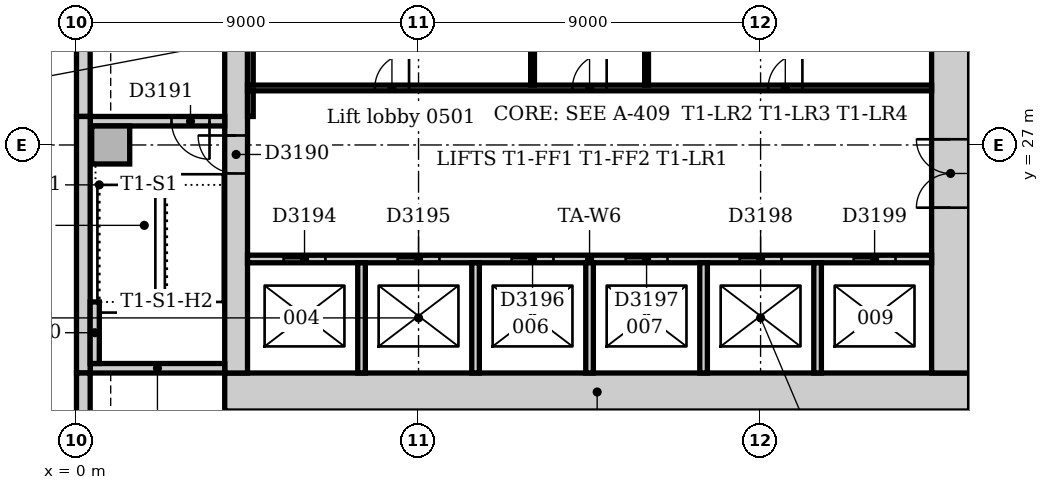
"""IFC4 building model, lengths in metres.
Left out: names, types, materials, properties, quantities, classifications, styles, units other than length and angle.
Written with IfcOpenShell. Run it as: python <this file> out.ifc"""

import sys

from ifc_helpers import new_model, si_unit, direction, frame, frame_2d, origin, origin_2d, place, context, subcontext, project, spatial, rectangle, extrude, element, fill, save


model = new_model("IFC4")
c1 = context("Model", 3, precision=1e-05, world=origin(), true_north=direction((0.0, 1.0)))
c2 = subcontext(c1, "Body", "Model", "MODEL_VIEW")
j1 = project(units=[si_unit("LENGTHUNIT", "METRE"), si_unit("PLANEANGLEUNIT", "RADIAN")], contexts=[c1])
p1 = place(None, origin())
s1 = spatial("IfcSite", under=j1, at=p1, CompositionType="ELEMENT")
p2 = place(p1, origin())
s2 = spatial("IfcBuilding", under=s1, at=p2, CompositionType="ELEMENT")
p3 = place(p2, frame((0.0, 0.0, 26.0)))
s3 = spatial("IfcBuildingStorey", under=s2, at=p3, CompositionType="ELEMENT", Elevation=26.0)
p4 = place(p3, frame((3.9, 20.5, 0.0), z_axis=(0.0, 0.0, 1.0), x_axis=(1.0, 0.0, 0.0)))
e1 = element("IfcWall", 1, at=p4, inside=s3, PredefinedType="SOLIDWALL", context=c2, shape_type="SweptSolid", body=[
    extrude(rectangle(XDim=19.6, YDim=1.0, at=frame_2d((9.8, 0.0))), origin(), (0.0, 0.0, 1.0), 4.0),
])
p5 = place(p3, frame((23.0, 21.0, 0.0), z_axis=(0.0, 0.0, 1.0), x_axis=(0.0, 1.0, 0.0)))
e2 = element("IfcWall", 2, at=p5, inside=s3, PredefinedType="SOLIDWALL", context=c2, shape_type="SweptSolid", body=[
    extrude(rectangle(XDim=10.5, YDim=1.0, at=frame_2d((5.25, 0.0))), origin(), (0.0, 0.0, 1.0), 4.0),
])
p6 = place(p5, frame((4.35, 0.0, 0.0)))
e3 = element("IfcOpeningElement", 3, at=p6, cuts=e2, PredefinedType="OPENING", context=c2, shape_type="SweptSolid", body=[
    extrude(rectangle(XDim=1.8, YDim=2.1, at=frame_2d((0.9, 1.05))), frame((0.0, 0.51, 0.0), z_axis=(0.0, -1.0, 0.0), x_axis=(1.0, 0.0, 0.0)), (0.0, 0.0, 1.0), 1.02),
])
p7 = place(p3, frame((4.2, 31.5, 0.0), z_axis=(0.0, 0.0, 1.0), x_axis=(0.0, -1.0, 0.0)))
e4 = element("IfcWall", 4, at=p7, inside=s3, PredefinedType="SOLIDWALL", context=c2, shape_type="SweptSolid", body=[
    extrude(rectangle(XDim=10.5, YDim=0.6, at=frame_2d((5.25, 0.0))), origin(), (0.0, 0.0, 1.0), 4.0),
])
p8 = place(p7, frame((4.25, 0.0, 0.0)))
e5 = element("IfcOpeningElement", 5, at=p8, cuts=e4, PredefinedType="OPENING", context=c2, shape_type="SweptSolid", body=[
    extrude(rectangle(XDim=1.0, YDim=2.1, at=frame_2d((0.5, 1.05))), frame((0.0, 0.31, 0.0), z_axis=(0.0, -1.0, 0.0), x_axis=(1.0, 0.0, 0.0)), (0.0, 0.0, 1.0), 0.62),
])
p9 = place(p3, frame((0.36, 21.125, 0.0), z_axis=(0.0, 0.0, 1.0), x_axis=(1.0, 0.0, 0.0)))
e6 = element("IfcWall", 6, at=p9, inside=s3, PredefinedType="SOLIDWALL", context=c2, shape_type="SweptSolid", body=[
    extrude(rectangle(XDim=3.54, YDim=0.25, at=frame_2d((1.77, 0.0))), origin(), (0.0, 0.0, 1.0), 4.0),
])
p10 = place(p3, frame((3.9, 27.625, 0.0), z_axis=(0.0, 0.0, 1.0), x_axis=(-1.0, 0.0, 0.0)))
e7 = element("IfcWall", 7, at=p10, inside=s3, PredefinedType="SOLIDWALL", context=c2, shape_type="SweptSolid", body=[
    extrude(rectangle(XDim=3.54, YDim=0.25, at=frame_2d((1.77, 0.0))), origin(), (0.0, 0.0, 1.0), 4.0),
])
p11 = place(p10, frame((0.4, 0.0, 0.0)))
e8 = element("IfcOpeningElement", 8, at=p11, cuts=e7, PredefinedType="OPENING", context=c2, shape_type="SweptSolid", body=[
    extrude(rectangle(XDim=1.0, YDim=2.1, at=frame_2d((0.5, 1.05))), frame((0.0, 0.135, 0.0), z_axis=(0.0, -1.0, 0.0), x_axis=(1.0, 0.0, 0.0)), (0.0, 0.0, 1.0), 0.27),
])
p12 = place(p3, frame((0.9, 27.0, 0.0), z_axis=(0.0, 0.0, 1.0), x_axis=(1.0, 0.0, 0.0)))
e9 = element("IfcColumn", 9, at=p12, inside=s3, PredefinedType="COLUMN", context=c2, shape_type="SweptSolid", body=[
    extrude(rectangle(XDim=1.0, YDim=1.0, at=origin_2d()), origin(), (0.0, 0.0, 1.0), 4.0),
])
p13 = place(p3, frame((0.18, 35.25, 0.0), z_axis=(0.0, 0.0, 1.0), x_axis=(0.0, -1.0, 0.0)))
e10 = element("IfcWall", 10, at=p13, inside=s3, PredefinedType="STANDARD", context=c2, shape_type="SweptSolid", body=[
    extrude(rectangle(XDim=7.5, YDim=0.36, at=frame_2d((3.75, 0.0))), origin(), (0.0, 0.0, 1.0), 3.85),
])
p14 = place(p3, frame((0.18, 27.75, 0.0), z_axis=(0.0, 0.0, 1.0), x_axis=(0.0, -1.0, 0.0)))
e11 = element("IfcWall", 11, at=p14, inside=s3, PredefinedType="STANDARD", context=c2, shape_type="SweptSolid", body=[
    extrude(rectangle(XDim=6.75, YDim=0.36, at=frame_2d((3.375, 0.0))), origin(), (0.0, 0.0, 1.0), 3.85),
])
p15 = place(p3, frame((0.18, 21.0, 0.0), z_axis=(0.0, 0.0, 1.0), x_axis=(0.0, -1.0, 0.0)))
e12 = element("IfcWall", 12, at=p15, inside=s3, PredefinedType="STANDARD", context=c2, shape_type="SweptSolid", body=[
    extrude(rectangle(XDim=16.757, YDim=0.36, at=frame_2d((8.379, 0.0))), origin(), (0.0, 0.0, 1.0), 3.85),
])
p16 = place(p15, frame((1.35, 0.0, 0.9)))
e13 = element("IfcOpeningElement", 13, at=p16, cuts=e12, PredefinedType="OPENING", context=c2, shape_type="SweptSolid", body=[
    extrude(rectangle(XDim=3.3, YDim=1.6, at=frame_2d((1.65, 0.8))), frame((0.0, 0.19, 0.0), z_axis=(0.0, -1.0, 0.0), x_axis=(1.0, 0.0, 0.0)), (0.0, 0.0, 1.0), 0.38),
])
p17 = place(p15, frame((6.15, 0.0, 0.9)))
e14 = element("IfcOpeningElement", 14, at=p17, cuts=e12, PredefinedType="OPENING", context=c2, shape_type="SweptSolid", body=[
    extrude(rectangle(XDim=3.3, YDim=1.6, at=frame_2d((1.65, 0.8))), frame((0.0, 0.19, 0.0), z_axis=(0.0, -1.0, 0.0), x_axis=(1.0, 0.0, 0.0)), (0.0, 0.0, 1.0), 0.38),
])
p18 = place(p15, frame((10.35, 0.0, 0.9)))
e15 = element("IfcOpeningElement", 15, at=p18, cuts=e12, PredefinedType="OPENING", context=c2, shape_type="SweptSolid", body=[
    extrude(rectangle(XDim=3.3, YDim=1.6, at=frame_2d((1.65, 0.8))), frame((0.0, 0.19, 0.0), z_axis=(0.0, -1.0, 0.0), x_axis=(1.0, 0.0, 0.0)), (0.0, 0.0, 1.0), 0.38),
])
p19 = place(p3, frame((0.48, 21.25, 0.0), z_axis=(0.0, 0.0, 1.0), x_axis=(0.0, 1.0, 0.0)))
e16 = element("IfcWall", 16, at=p19, inside=s3, PredefinedType="STANDARD", context=c2, shape_type="SweptSolid", body=[
    extrude(rectangle(XDim=1.62, YDim=0.24, at=frame_2d((0.81, 0.0))), origin(), (0.0, 0.0, 1.0), 4.0),
])
p20 = place(p3, frame((4.5, 24.0, 0.0), z_axis=(0.0, 0.0, 1.0), x_axis=(1.0, 0.0, 0.0)))
e17 = element("IfcWall", 17, at=p20, inside=s3, PredefinedType="PARTITIONING", context=c2, shape_type="SweptSolid", body=[
    extrude(rectangle(XDim=18.0, YDim=0.2, at=frame_2d((9.0, 0.0))), origin(), (0.0, 0.0, 1.0), 3.85),
])
p21 = place(p20, frame((0.95, 0.0, 0.0)))
e18 = element("IfcOpeningElement", 18, at=p21, cuts=e17, PredefinedType="OPENING", context=c2, shape_type="SweptSolid", body=[
    extrude(rectangle(XDim=1.1, YDim=2.1, at=frame_2d((0.55, 1.05))), frame((0.0, 0.11, 0.0), z_axis=(0.0, -1.0, 0.0), x_axis=(1.0, 0.0, 0.0)), (0.0, 0.0, 1.0), 0.22),
])
p22 = place(p20, frame((3.95, 0.0, 0.0)))
e19 = element("IfcOpeningElement", 19, at=p22, cuts=e17, PredefinedType="OPENING", context=c2, shape_type="SweptSolid", body=[
    extrude(rectangle(XDim=1.1, YDim=2.1, at=frame_2d((0.55, 1.05))), frame((0.0, 0.11, 0.0), z_axis=(0.0, -1.0, 0.0), x_axis=(1.0, 0.0, 0.0)), (0.0, 0.0, 1.0), 0.22),
])
p23 = place(p20, frame((6.95, 0.0, 0.0)))
e20 = element("IfcOpeningElement", 20, at=p23, cuts=e17, PredefinedType="OPENING", context=c2, shape_type="SweptSolid", body=[
    extrude(rectangle(XDim=1.1, YDim=2.1, at=frame_2d((0.55, 1.05))), frame((0.0, 0.11, 0.0), z_axis=(0.0, -1.0, 0.0), x_axis=(1.0, 0.0, 0.0)), (0.0, 0.0, 1.0), 0.22),
])
p24 = place(p20, frame((9.95, 0.0, 0.0)))
e21 = element("IfcOpeningElement", 21, at=p24, cuts=e17, PredefinedType="OPENING", context=c2, shape_type="SweptSolid", body=[
    extrude(rectangle(XDim=1.1, YDim=2.1, at=frame_2d((0.55, 1.05))), frame((0.0, 0.11, 0.0), z_axis=(0.0, -1.0, 0.0), x_axis=(1.0, 0.0, 0.0)), (0.0, 0.0, 1.0), 0.22),
])
p25 = place(p20, frame((12.95, 0.0, 0.0)))
e22 = element("IfcOpeningElement", 22, at=p25, cuts=e17, PredefinedType="OPENING", context=c2, shape_type="SweptSolid", body=[
    extrude(rectangle(XDim=1.1, YDim=2.1, at=frame_2d((0.55, 1.05))), frame((0.0, 0.11, 0.0), z_axis=(0.0, -1.0, 0.0), x_axis=(1.0, 0.0, 0.0)), (0.0, 0.0, 1.0), 0.22),
])
p26 = place(p20, frame((15.95, 0.0, 0.0)))
e23 = element("IfcOpeningElement", 23, at=p26, cuts=e17, PredefinedType="OPENING", context=c2, shape_type="SweptSolid", body=[
    extrude(rectangle(XDim=1.1, YDim=2.1, at=frame_2d((0.55, 1.05))), frame((0.0, 0.11, 0.0), z_axis=(0.0, -1.0, 0.0), x_axis=(1.0, 0.0, 0.0)), (0.0, 0.0, 1.0), 0.22),
])
for number, where, z_axis, x_axis in (
    (24, (7.5, 21.0, 0.0), (0.0, 0.0, 1.0), (0.0, 1.0, 0.0)),
    (25, (10.5, 21.0, 0.0), (0.0, 0.0, 1.0), (0.0, 1.0, 0.0)),
    (26, (13.5, 21.0, 0.0), (0.0, 0.0, 1.0), (0.0, 1.0, 0.0)),
    (27, (16.5, 21.0, 0.0), (0.0, 0.0, 1.0), (0.0, 1.0, 0.0)),
    (28, (19.5, 21.0, 0.0), (0.0, 0.0, 1.0), (0.0, 1.0, 0.0)),
):
    element("IfcWall", number, at=place(p3, frame(where, z_axis=z_axis, x_axis=x_axis)), inside=s3, PredefinedType="PARTITIONING", context=c2, shape_type="SweptSolid", body=[
        extrude(rectangle(XDim=2.9, YDim=0.2, at=frame_2d((1.45, 0.0))), origin(), (0.0, 0.0, 1.0), 3.85),
    ])
p27 = place(p3, frame((4.5, 28.5, 0.0), z_axis=(0.0, 0.0, 1.0), x_axis=(1.0, 0.0, 0.0)))
e29 = element("IfcWall", 29, at=p27, inside=s3, PredefinedType="PARTITIONING", context=c2, shape_type="SweptSolid", body=[
    extrude(rectangle(XDim=18.0, YDim=0.15, at=frame_2d((9.0, 0.0))), origin(), (0.0, 0.0, 1.0), 3.85),
])
p28 = place(p27, frame((3.35, 0.0, 0.0)))
e30 = element("IfcOpeningElement", 30, at=p28, cuts=e29, PredefinedType="OPENING", context=c2, shape_type="SweptSolid", body=[
    extrude(rectangle(XDim=0.9, YDim=2.1, at=frame_2d((0.45, 1.05))), frame((0.0, 0.085, 0.0), z_axis=(0.0, -1.0, 0.0), x_axis=(1.0, 0.0, 0.0)), (0.0, 0.0, 1.0), 0.17),
])
p29 = place(p27, frame((8.55, 0.0, 0.0)))
e31 = element("IfcOpeningElement", 31, at=p29, cuts=e29, PredefinedType="OPENING", context=c2, shape_type="SweptSolid", body=[
    extrude(rectangle(XDim=0.9, YDim=2.1, at=frame_2d((0.45, 1.05))), frame((0.0, 0.085, 0.0), z_axis=(0.0, -1.0, 0.0), x_axis=(1.0, 0.0, 0.0)), (0.0, 0.0, 1.0), 0.17),
])
p30 = place(p27, frame((13.7, 0.0, 0.0)))
e32 = element("IfcOpeningElement", 32, at=p30, cuts=e29, PredefinedType="OPENING", context=c2, shape_type="SweptSolid", body=[
    extrude(rectangle(XDim=0.9, YDim=2.1, at=frame_2d((0.45, 1.05))), frame((0.0, 0.085, 0.0), z_axis=(0.0, -1.0, 0.0), x_axis=(1.0, 0.0, 0.0)), (0.0, 0.0, 1.0), 0.17),
])
p31 = place(p3, frame((4.575, 27.75, 0.0), z_axis=(0.0, 0.0, 1.0), x_axis=(0.0, 1.0, 0.0)))
e33 = element("IfcWall", 33, at=p31, inside=s3, PredefinedType="PARTITIONING", context=c2, shape_type="SweptSolid", body=[
    extrude(rectangle(XDim=0.675, YDim=0.15, at=frame_2d((0.338, 0.0))), origin(), (0.0, 0.0, 1.0), 3.85),
])
p32 = place(p3, frame((4.575, 28.575, 0.0), z_axis=(0.0, 0.0, 1.0), x_axis=(0.0, 1.0, 0.0)))
e34 = element("IfcWall", 34, at=p32, inside=s3, PredefinedType="PARTITIONING", context=c2, shape_type="SweptSolid", body=[
    extrude(rectangle(XDim=2.675, YDim=0.15, at=frame_2d((1.337, 0.0))), origin(), (0.0, 0.0, 1.0), 3.85),
])
for number, where, z_axis, x_axis in (
    (35, (12.0, 28.575, 0.0), (0.0, 0.0, 1.0), (0.0, 1.0, 0.0)),
    (36, (15.0, 28.575, 0.0), (0.0, 0.0, 1.0), (0.0, 1.0, 0.0)),
):
    element("IfcWall", number, at=place(p3, frame(where, z_axis=z_axis, x_axis=x_axis)), inside=s3, PredefinedType="PARTITIONING", context=c2, shape_type="SweptSolid", body=[
        extrude(rectangle(XDim=2.675, YDim=0.1, at=frame_2d((1.337, 0.0))), origin(), (0.0, 0.0, 1.0), 3.85),
    ])
p33 = place(p8, frame((1.0, 0.0, 0.0), z_axis=(0.0, 0.0, 1.0), x_axis=(-1.0, 0.0, 0.0)))
e37 = element("IfcDoor", 37, at=p33, inside=s3, OperationType="SINGLE_SWING_RIGHT", PredefinedType="DOOR", context=c2, shape_type="SweptSolid", body=[
    extrude(rectangle(XDim=1.0, YDim=2.1, at=frame_2d((0.5, 1.05))), frame((0.0, 0.025, 0.0), z_axis=(0.0, -1.0, 0.0), x_axis=(1.0, 0.0, 0.0)), (0.0, 0.0, 1.0), 0.05),
])
fill(e5, e37)
p34 = place(p11, origin())
e38 = element("IfcDoor", 38, at=p34, inside=s3, OperationType="SINGLE_SWING_LEFT", PredefinedType="DOOR", context=c2, shape_type="SweptSolid", body=[
    extrude(rectangle(XDim=1.0, YDim=2.1, at=frame_2d((0.5, 1.05))), frame((0.0, 0.025, 0.0), z_axis=(0.0, -1.0, 0.0), x_axis=(1.0, 0.0, 0.0)), (0.0, 0.0, 1.0), 0.05),
])
fill(e8, e38)
p35 = place(p21, origin())
e39 = element("IfcDoor", 39, at=p35, inside=s3, OperationType="SLIDING_TO_LEFT", PredefinedType="DOOR", context=c2, shape_type="SweptSolid", body=[
    extrude(rectangle(XDim=1.1, YDim=2.1, at=frame_2d((0.55, 1.05))), frame((0.0, 0.025, 0.0), z_axis=(0.0, -1.0, 0.0), x_axis=(1.0, 0.0, 0.0)), (0.0, 0.0, 1.0), 0.05),
])
fill(e18, e39)
p36 = place(p22, origin())
e40 = element("IfcDoor", 40, at=p36, inside=s3, OperationType="SLIDING_TO_LEFT", PredefinedType="DOOR", context=c2, shape_type="SweptSolid", body=[
    extrude(rectangle(XDim=1.1, YDim=2.1, at=frame_2d((0.55, 1.05))), frame((0.0, 0.025, 0.0), z_axis=(0.0, -1.0, 0.0), x_axis=(1.0, 0.0, 0.0)), (0.0, 0.0, 1.0), 0.05),
])
fill(e19, e40)
p37 = place(p23, origin())
e41 = element("IfcDoor", 41, at=p37, inside=s3, OperationType="SLIDING_TO_LEFT", PredefinedType="DOOR", context=c2, shape_type="SweptSolid", body=[
    extrude(rectangle(XDim=1.1, YDim=2.1, at=frame_2d((0.55, 1.05))), frame((0.0, 0.025, 0.0), z_axis=(0.0, -1.0, 0.0), x_axis=(1.0, 0.0, 0.0)), (0.0, 0.0, 1.0), 0.05),
])
fill(e20, e41)
p38 = place(p24, origin())
e42 = element("IfcDoor", 42, at=p38, inside=s3, OperationType="SLIDING_TO_LEFT", PredefinedType="DOOR", context=c2, shape_type="SweptSolid", body=[
    extrude(rectangle(XDim=1.1, YDim=2.1, at=frame_2d((0.55, 1.05))), frame((0.0, 0.025, 0.0), z_axis=(0.0, -1.0, 0.0), x_axis=(1.0, 0.0, 0.0)), (0.0, 0.0, 1.0), 0.05),
])
fill(e21, e42)
p39 = place(p25, origin())
e43 = element("IfcDoor", 43, at=p39, inside=s3, OperationType="SLIDING_TO_LEFT", PredefinedType="DOOR", context=c2, shape_type="SweptSolid", body=[
    extrude(rectangle(XDim=1.1, YDim=2.1, at=frame_2d((0.55, 1.05))), frame((0.0, 0.025, 0.0), z_axis=(0.0, -1.0, 0.0), x_axis=(1.0, 0.0, 0.0)), (0.0, 0.0, 1.0), 0.05),
])
fill(e22, e43)
p40 = place(p26, origin())
e44 = element("IfcDoor", 44, at=p40, inside=s3, OperationType="SLIDING_TO_LEFT", PredefinedType="DOOR", context=c2, shape_type="SweptSolid", body=[
    extrude(rectangle(XDim=1.1, YDim=2.1, at=frame_2d((0.55, 1.05))), frame((0.0, 0.025, 0.0), z_axis=(0.0, -1.0, 0.0), x_axis=(1.0, 0.0, 0.0)), (0.0, 0.0, 1.0), 0.05),
])
fill(e23, e44)
p41 = place(p6, origin())
e45 = element("IfcDoor", 45, at=p41, inside=s3, OperationType="DOUBLE_DOOR_DOUBLE_SWING", PredefinedType="DOOR", context=c2, shape_type="SweptSolid", body=[
    extrude(rectangle(XDim=1.8, YDim=2.1, at=frame_2d((0.9, 1.05))), frame((0.0, 0.025, 0.0), z_axis=(0.0, -1.0, 0.0), x_axis=(1.0, 0.0, 0.0)), (0.0, 0.0, 1.0), 0.05),
])
fill(e3, e45)
p42 = place(p28, origin())
e46 = element("IfcDoor", 46, at=p42, inside=s3, OperationType="SINGLE_SWING_RIGHT", PredefinedType="DOOR", context=c2, shape_type="SweptSolid", body=[
    extrude(rectangle(XDim=0.9, YDim=2.1, at=frame_2d((0.45, 1.05))), frame((0.0, 0.025, 0.0), z_axis=(0.0, -1.0, 0.0), x_axis=(1.0, 0.0, 0.0)), (0.0, 0.0, 1.0), 0.05),
])
fill(e30, e46)
p43 = place(p29, origin())
e47 = element("IfcDoor", 47, at=p43, inside=s3, OperationType="SINGLE_SWING_RIGHT", PredefinedType="DOOR", context=c2, shape_type="SweptSolid", body=[
    extrude(rectangle(XDim=0.9, YDim=2.1, at=frame_2d((0.45, 1.05))), frame((0.0, 0.025, 0.0), z_axis=(0.0, -1.0, 0.0), x_axis=(1.0, 0.0, 0.0)), (0.0, 0.0, 1.0), 0.05),
])
fill(e31, e47)
p44 = place(p30, origin())
e48 = element("IfcDoor", 48, at=p44, inside=s3, OperationType="SINGLE_SWING_RIGHT", PredefinedType="DOOR", context=c2, shape_type="SweptSolid", body=[
    extrude(rectangle(XDim=0.9, YDim=2.1, at=frame_2d((0.45, 1.05))), frame((0.0, 0.025, 0.0), z_axis=(0.0, -1.0, 0.0), x_axis=(1.0, 0.0, 0.0)), (0.0, 0.0, 1.0), 0.05),
])
fill(e32, e48)
save(model, sys.argv[1])
